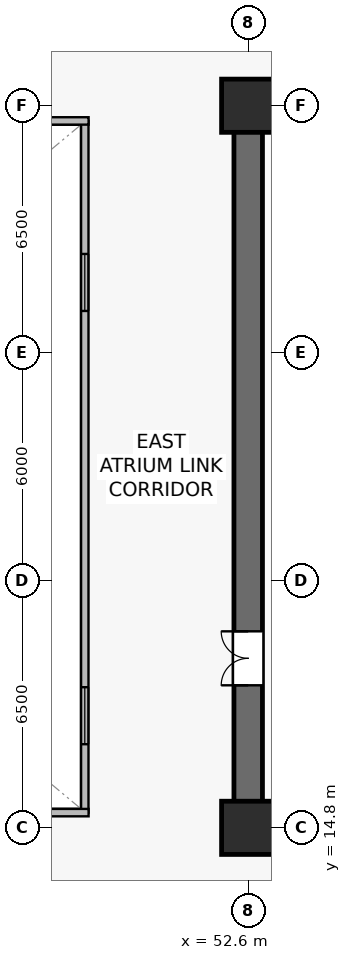
"""IFC4 building model, lengths in metres.
Left out: names, types, materials, properties, quantities, classifications, styles, units other than length and angle.
Written with IfcOpenShell. Run it as: python <this file> out.ifc"""

import sys

from ifc_helpers import new_model, si_unit, direction, frame, frame_2d, origin, origin_2d, place, context, subcontext, project, spatial, rectangle, extrude, source, transform, mapped, element, fill, save


model = new_model("IFC4")
c1 = context("Model", 3, precision=1e-05, world=origin(), true_north=direction((0.0, 1.0)))
c2 = subcontext(c1, "Body", "Model", "MODEL_VIEW")
j1 = project(units=[si_unit("LENGTHUNIT", "METRE"), si_unit("PLANEANGLEUNIT", "RADIAN")], contexts=[c1])
p1 = place(None, origin())
s1 = spatial("IfcSite", under=j1, at=p1, CompositionType="ELEMENT")
p2 = place(p1, origin())
s2 = spatial("IfcBuilding", under=s1, at=p2, CompositionType="ELEMENT")
p3 = place(p2, frame((0.0, 0.0, 74.4)))
s3 = spatial("IfcBuildingStorey", under=s2, at=p3, CompositionType="ELEMENT", Elevation=74.4)
p4 = place(p3, frame((52.225, 14.8, 0.0), z_axis=(0.0, 0.0, 1.0), x_axis=(1.0, 0.0, 0.0)))
e1 = element("IfcWall", 1, at=p4, inside=s3, PredefinedType="SHEAR", context=c2, shape_type="SweptSolid", body=[
    extrude(rectangle(XDim=15.55, YDim=0.75, at=frame_2d((7.775, 0.0))), origin(), (0.0, 0.0, 1.0), 3.78),
])
p5 = place(p3, frame((52.225, 33.8, 0.0), z_axis=(0.0, 0.0, 1.0), x_axis=(1.0, 0.0, 0.0)))
e2 = element("IfcWall", 2, at=p5, inside=s3, PredefinedType="SHEAR", context=c2, shape_type="SweptSolid", body=[
    extrude(rectangle(XDim=15.55, YDim=0.75, at=frame_2d((7.775, 0.0))), origin(), (0.0, 0.0, 1.0), 3.78),
])
p6 = place(p5, frame((7.725, 0.0, 0.0)))
e3 = element("IfcOpeningElement", 3, at=p6, cuts=e2, PredefinedType="OPENING", context=c2, shape_type="SweptSolid", body=[
    extrude(rectangle(XDim=0.95, YDim=2.15, at=frame_2d((0.475, 1.075))), frame((0.0, 0.385, 0.0), z_axis=(0.0, -1.0, 0.0), x_axis=(1.0, 0.0, 0.0)), (0.0, 0.0, 1.0), 0.77),
])
p7 = place(p5, frame((2.66, 0.0, 0.0)))
e4 = element("IfcOpeningElement", 4, at=p7, cuts=e2, PredefinedType="OPENING", context=c2, shape_type="SweptSolid", body=[
    extrude(rectangle(XDim=0.95, YDim=2.15, at=frame_2d((0.475, 1.075))), frame((0.0, 0.385, 0.0), z_axis=(0.0, -1.0, 0.0), x_axis=(1.0, 0.0, 0.0)), (0.0, 0.0, 1.0), 0.77),
])
p8 = place(p3, frame((52.6, 15.175, 0.0), z_axis=(0.0, 0.0, 1.0), x_axis=(0.0, 1.0, 0.0)))
e5 = element("IfcWall", 5, at=p8, inside=s3, PredefinedType="SHEAR", context=c2, shape_type="SweptSolid", body=[
    extrude(rectangle(XDim=18.25, YDim=0.75, at=frame_2d((9.125, 0.0))), origin(), (0.0, 0.0, 1.0), 3.78),
])
p9 = place(p8, frame((3.375, 0.0, 0.0)))
e6 = element("IfcOpeningElement", 6, at=p9, cuts=e5, PredefinedType="OPENING", context=c2, shape_type="SweptSolid", body=[
    extrude(rectangle(XDim=1.42, YDim=2.2, at=frame_2d((0.71, 1.1))), frame((0.0, 0.385, 0.0), z_axis=(0.0, -1.0, 0.0), x_axis=(1.0, 0.0, 0.0)), (0.0, 0.0, 1.0), 0.77),
])
m1 = source(origin(), c2, "Body", "SweptSolid", [
    extrude(rectangle(XDim=1.4, YDim=1.4, at=origin_2d()), origin(), (0.0, 0.0, 1.0), 4.1),
])
for number, where, z_axis, x_axis in (
    (7, (52.6, 14.8, 0.0), (0.0, 0.0, 1.0), (1.0, 0.0, 0.0)),
    (8, (52.6, 33.8, 0.0), (0.0, 0.0, 1.0), (1.0, 0.0, 0.0)),
):
    element("IfcColumn", number, at=place(p3, frame(where, z_axis=z_axis, x_axis=x_axis)), inside=s3, PredefinedType="COLUMN", context=c2, shape_type="MappedRepresentation", body=[
        mapped(m1, transform((0.0, 0.0, 0.0), scale=1.0)),
    ])
p10 = place(p3, frame((48.3, 15.2, 0.0), z_axis=(0.0, 0.0, 1.0), x_axis=(0.0, 1.0, 0.0)))
e9 = element("IfcWall", 9, at=p10, inside=s3, PredefinedType="SOLIDWALL", context=c2, shape_type="SweptSolid", body=[
    extrude(rectangle(XDim=18.2, YDim=0.195, at=frame_2d((9.1, 0.0))), origin(), (0.0, 0.0, 1.0), 3.78),
])
p11 = place(p10, frame((1.8, 0.0, 0.9)))
e10 = element("IfcOpeningElement", 10, at=p11, cuts=e9, PredefinedType="OPENING", context=c2, shape_type="SweptSolid", body=[
    extrude(rectangle(XDim=1.5, YDim=1.4, at=frame_2d((0.75, 0.7))), frame((0.0, 0.107, 0.0), z_axis=(0.0, -1.0, 0.0), x_axis=(1.0, 0.0, 0.0)), (0.0, 0.0, 1.0), 0.215),
])
p12 = place(p10, frame((13.2, 0.0, 0.9)))
e11 = element("IfcOpeningElement", 11, at=p12, cuts=e9, PredefinedType="OPENING", context=c2, shape_type="SweptSolid", body=[
    extrude(rectangle(XDim=1.5, YDim=1.4, at=frame_2d((0.75, 0.7))), frame((0.0, 0.107, 0.0), z_axis=(0.0, -1.0, 0.0), x_axis=(1.0, 0.0, 0.0)), (0.0, 0.0, 1.0), 0.215),
])
for number, where, z_axis, x_axis in (
    (12, (26.4, 15.2, 0.0), (0.0, 0.0, 1.0), (1.0, 0.0, 0.0)),
    (13, (26.4, 33.4, 0.0), (0.0, 0.0, 1.0), (1.0, 0.0, 0.0)),
):
    element("IfcWall", number, at=place(p3, frame(where, z_axis=z_axis, x_axis=x_axis)), inside=s3, PredefinedType="SOLIDWALL", context=c2, shape_type="SweptSolid", body=[
        extrude(rectangle(XDim=22.0, YDim=0.195, at=frame_2d((11.0, 0.0))), origin(), (0.0, 0.0, 1.0), 3.78),
    ])
m2 = source(origin(), c2, "Body", "SweptSolid", [
    extrude(rectangle(XDim=1.5, YDim=1.4, at=frame_2d((0.75, 0.7))), frame((0.0, 0.03, 0.0), z_axis=(0.0, -1.0, 0.0), x_axis=(1.0, 0.0, 0.0)), (0.0, 0.0, 1.0), 0.06),
])
p13 = place(p11, origin())
e14 = element("IfcWindow", 14, at=p13, inside=s3, PartitioningType="SINGLE_PANEL", PredefinedType="WINDOW", context=c2, shape_type="MappedRepresentation", body=[
    mapped(m2, transform((0.0, 0.0, 0.0), scale=1.0)),
])
fill(e10, e14)
p14 = place(p12, origin())
e15 = element("IfcWindow", 15, at=p14, inside=s3, PartitioningType="SINGLE_PANEL", PredefinedType="WINDOW", context=c2, shape_type="MappedRepresentation", body=[
    mapped(m2, transform((0.0, 0.0, 0.0), scale=1.0)),
])
fill(e11, e15)
m3 = source(origin(), c2, "Body", "SweptSolid", [
    extrude(rectangle(XDim=1.42, YDim=2.2, at=frame_2d((0.71, 1.1))), frame((0.0, 0.025, 0.0), z_axis=(0.0, -1.0, 0.0), x_axis=(1.0, 0.0, 0.0)), (0.0, 0.0, 1.0), 0.05),
])
p15 = place(p9, origin())
e16 = element("IfcDoor", 16, at=p15, inside=s3, OperationType="DOUBLE_DOOR_SINGLE_SWING", PredefinedType="DOOR", context=c2, shape_type="MappedRepresentation", body=[
    mapped(m3, transform((0.0, 0.0, 0.0), scale=1.0)),
])
fill(e6, e16)
save(model, sys.argv[1])
